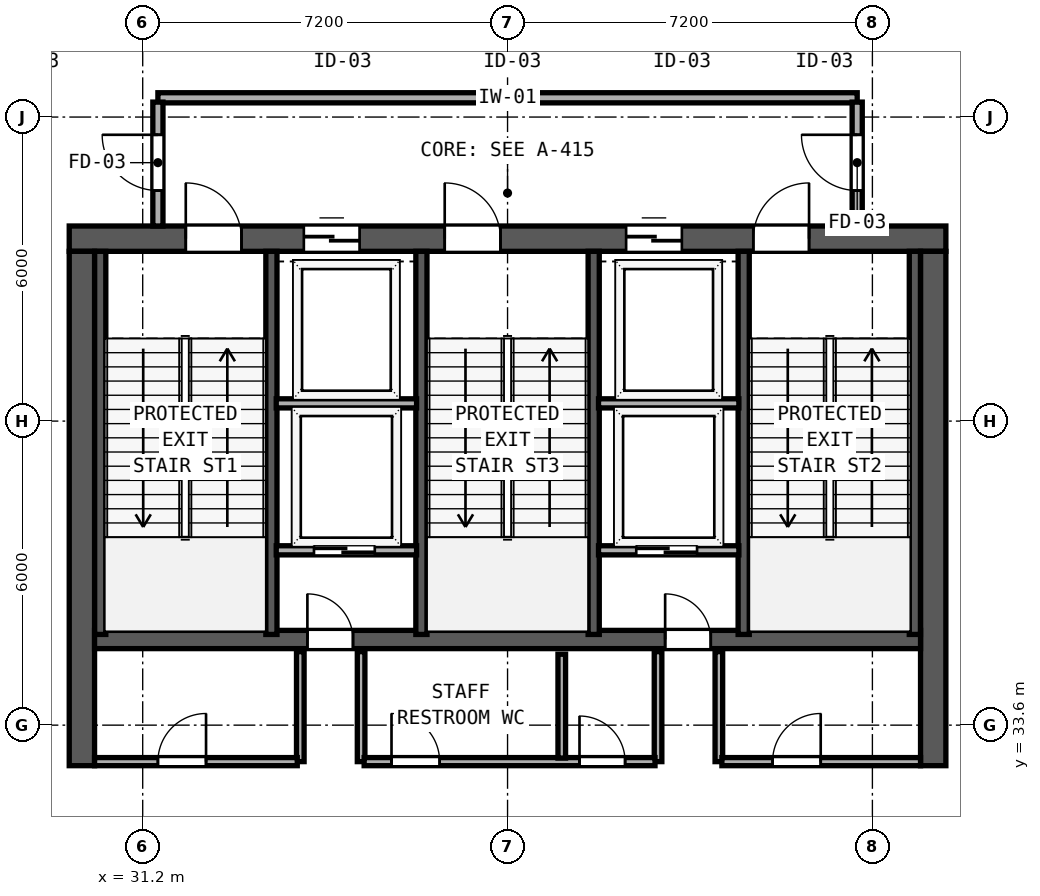
"""IFC4 building model, lengths in metres.
Left out: names, types, materials, properties, quantities, classifications, styles, units other than length and angle.
Written with IfcOpenShell. Run it as: python <this file> out.ifc"""

import sys

from ifc_helpers import new_model, si_unit, direction, frame, frame_2d, origin, place, context, subcontext, project, spatial, rectangle, extrude, element, fill, save


model = new_model("IFC4")
c1 = context("Model", 3, precision=1e-05, world=origin(), true_north=direction((0.0, 1.0)))
c2 = subcontext(c1, "Body", "Model", "MODEL_VIEW")
j1 = project(units=[si_unit("LENGTHUNIT", "METRE"), si_unit("PLANEANGLEUNIT", "RADIAN")], contexts=[c1])
p1 = place(None, origin())
s1 = spatial("IfcSite", under=j1, at=p1, CompositionType="ELEMENT")
p2 = place(p1, origin())
s2 = spatial("IfcBuilding", under=s1, at=p2, CompositionType="ELEMENT")
p3 = place(p2, frame((0.0, 0.0, 318.2)))
s3 = spatial("IfcBuildingStorey", under=s2, at=p3, CompositionType="ELEMENT", Elevation=318.2)
p4 = place(p3, frame((29.75, 43.2, 0.0), z_axis=(0.0, 0.0, 1.0), x_axis=(1.0, 0.0, 0.0)))
e1 = element("IfcWall", 1, at=p4, inside=s3, PredefinedType="SHEAR", context=c2, shape_type="SweptSolid", body=[
    extrude(rectangle(XDim=17.3, YDim=0.5, at=frame_2d((8.65, 0.0))), origin(), (0.0, 0.0, 1.0), 4.76),
])
p5 = place(p4, frame((2.3, 0.0, 0.0)))
e2 = element("IfcOpeningElement", 2, at=p5, cuts=e1, PredefinedType="OPENING", context=c2, shape_type="SweptSolid", body=[
    extrude(rectangle(XDim=1.1, YDim=2.15, at=frame_2d((0.55, 1.075))), frame((0.0, 0.26, 0.0), z_axis=(0.0, -1.0, 0.0), x_axis=(1.0, 0.0, 0.0)), (0.0, 0.0, 1.0), 0.52),
])
p6 = place(p4, frame((7.41, 0.0, 0.0)))
e3 = element("IfcOpeningElement", 3, at=p6, cuts=e1, PredefinedType="OPENING", context=c2, shape_type="SweptSolid", body=[
    extrude(rectangle(XDim=1.1, YDim=2.15, at=frame_2d((0.55, 1.075))), frame((0.0, 0.26, 0.0), z_axis=(0.0, -1.0, 0.0), x_axis=(1.0, 0.0, 0.0)), (0.0, 0.0, 1.0), 0.52),
])
p7 = place(p4, frame((13.5, 0.0, 0.0)))
e4 = element("IfcOpeningElement", 4, at=p7, cuts=e1, PredefinedType="OPENING", context=c2, shape_type="SweptSolid", body=[
    extrude(rectangle(XDim=1.1, YDim=2.15, at=frame_2d((0.55, 1.075))), frame((0.0, 0.26, 0.0), z_axis=(0.0, -1.0, 0.0), x_axis=(1.0, 0.0, 0.0)), (0.0, 0.0, 1.0), 0.52),
])
p8 = place(p4, frame((4.63, 0.0, 0.0)))
e5 = element("IfcOpeningElement", 5, at=p8, cuts=e1, PredefinedType="OPENING", context=c2, shape_type="SweptSolid", body=[
    extrude(rectangle(XDim=1.1, YDim=2.2, at=frame_2d((0.55, 1.1))), frame((0.0, 0.26, 0.0), z_axis=(0.0, -1.0, 0.0), x_axis=(1.0, 0.0, 0.0)), (0.0, 0.0, 1.0), 0.52),
])
p9 = place(p4, frame((10.99, 0.0, 0.0)))
e6 = element("IfcOpeningElement", 6, at=p9, cuts=e1, PredefinedType="OPENING", context=c2, shape_type="SweptSolid", body=[
    extrude(rectangle(XDim=1.1, YDim=2.2, at=frame_2d((0.55, 1.1))), frame((0.0, 0.26, 0.0), z_axis=(0.0, -1.0, 0.0), x_axis=(1.0, 0.0, 0.0)), (0.0, 0.0, 1.0), 0.52),
])
for number, where, z_axis, x_axis in (
    (7, (30.0, 32.8, 0.0), (0.0, 0.0, 1.0), (0.0, 1.0, 0.0)),
    (8, (46.8, 32.8, 0.0), (0.0, 0.0, 1.0), (0.0, 1.0, 0.0)),
):
    element("IfcWall", number, at=place(p3, frame(where, z_axis=z_axis, x_axis=x_axis)), inside=s3, PredefinedType="SHEAR", context=c2, shape_type="SweptSolid", body=[
        extrude(rectangle(XDim=10.15, YDim=0.5, at=frame_2d((5.075, 0.0))), origin(), (0.0, 0.0, 1.0), 4.76),
    ])
p10 = place(p3, frame((30.25, 35.29, 0.0), z_axis=(0.0, 0.0, 1.0), x_axis=(1.0, 0.0, 0.0)))
e9 = element("IfcWall", 9, at=p10, inside=s3, PredefinedType="SHEAR", context=c2, shape_type="SweptSolid", body=[
    extrude(rectangle(XDim=16.3, YDim=0.36, at=frame_2d((8.15, 0.0))), origin(), (0.0, 0.0, 1.0), 4.76),
])
p11 = place(p10, frame((5.1, 0.0, 0.0), z_axis=(0.0, 0.0, 1.0), x_axis=(-1.0, 0.0, 0.0)))
e10 = element("IfcOpeningElement", 10, at=p11, cuts=e9, PredefinedType="OPENING", context=c2, shape_type="SweptSolid", body=[
    extrude(rectangle(XDim=0.9, YDim=2.1, at=frame_2d((0.45, 1.05))), frame((0.0, 0.19, 0.0), z_axis=(0.0, -1.0, 0.0), x_axis=(1.0, 0.0, 0.0)), (0.0, 0.0, 1.0), 0.38),
])
p12 = place(p10, frame((12.16, 0.0, 0.0), z_axis=(0.0, 0.0, 1.0), x_axis=(-1.0, 0.0, 0.0)))
e11 = element("IfcOpeningElement", 11, at=p12, cuts=e9, PredefinedType="OPENING", context=c2, shape_type="SweptSolid", body=[
    extrude(rectangle(XDim=0.9, YDim=2.1, at=frame_2d((0.45, 1.05))), frame((0.0, 0.19, 0.0), z_axis=(0.0, -1.0, 0.0), x_axis=(1.0, 0.0, 0.0)), (0.0, 0.0, 1.0), 0.38),
])
for number, where, z_axis, x_axis in (
    (12, (30.362, 35.39, 0.0), (0.0, 0.0, 1.0), (0.0, 1.0, 0.0)),
    (13, (33.74, 35.39, 0.0), (0.0, 0.0, 1.0), (0.0, 1.0, 0.0)),
    (14, (36.7, 35.39, 0.0), (0.0, 0.0, 1.0), (0.0, 1.0, 0.0)),
    (15, (40.1, 35.39, 0.0), (0.0, 0.0, 1.0), (0.0, 1.0, 0.0)),
    (16, (43.06, 35.39, 0.0), (0.0, 0.0, 1.0), (0.0, 1.0, 0.0)),
    (17, (46.438, 35.39, 0.0), (0.0, 0.0, 1.0), (0.0, 1.0, 0.0)),
):
    element("IfcWall", number, at=place(p3, frame(where, z_axis=z_axis, x_axis=x_axis)), inside=s3, PredefinedType="SHEAR", context=c2, shape_type="SweptSolid", body=[
        extrude(rectangle(XDim=7.56, YDim=0.22, at=frame_2d((3.78, 0.0))), origin(), (0.0, 0.0, 1.0), 4.76),
    ])
p13 = place(p3, frame((31.5, 45.98, 0.0), z_axis=(0.0, 0.0, 1.0), x_axis=(1.0, 0.0, 0.0)))
e18 = element("IfcWall", 18, at=p13, inside=s3, PredefinedType="SOLIDWALL", context=c2, shape_type="SweptSolid", body=[
    extrude(rectangle(XDim=13.8, YDim=0.2, at=frame_2d((6.9, 0.0))), origin(), (0.0, 0.0, 1.0), 4.76),
])
p14 = place(p3, frame((31.5, 43.45, 0.0), z_axis=(0.0, 0.0, 1.0), x_axis=(0.0, 1.0, 0.0)))
e19 = element("IfcWall", 19, at=p14, inside=s3, PredefinedType="SOLIDWALL", context=c2, shape_type="SweptSolid", body=[
    extrude(rectangle(XDim=2.445, YDim=0.2, at=frame_2d((1.223, 0.0))), origin(), (0.0, 0.0, 1.0), 4.76),
])
p15 = place(p14, frame((1.8, 0.0, 0.0), z_axis=(0.0, 0.0, 1.0), x_axis=(-1.0, 0.0, 0.0)))
e20 = element("IfcOpeningElement", 20, at=p15, cuts=e19, PredefinedType="OPENING", context=c2, shape_type="SweptSolid", body=[
    extrude(rectangle(XDim=1.1, YDim=2.15, at=frame_2d((0.55, 1.075))), frame((0.0, 0.11, 0.0), z_axis=(0.0, -1.0, 0.0), x_axis=(1.0, 0.0, 0.0)), (0.0, 0.0, 1.0), 0.22),
])
p16 = place(p3, frame((45.3, 43.45, 0.0), z_axis=(0.0, 0.0, 1.0), x_axis=(0.0, 1.0, 0.0)))
e21 = element("IfcWall", 21, at=p16, inside=s3, PredefinedType="SOLIDWALL", context=c2, shape_type="SweptSolid", body=[
    extrude(rectangle(XDim=2.445, YDim=0.2, at=frame_2d((1.223, 0.0))), origin(), (0.0, 0.0, 1.0), 4.76),
])
p17 = place(p16, frame((0.7, 0.0, 0.0)))
e22 = element("IfcOpeningElement", 22, at=p17, cuts=e21, PredefinedType="OPENING", context=c2, shape_type="SweptSolid", body=[
    extrude(rectangle(XDim=1.1, YDim=2.15, at=frame_2d((0.55, 1.075))), frame((0.0, 0.11, 0.0), z_axis=(0.0, -1.0, 0.0), x_axis=(1.0, 0.0, 0.0)), (0.0, 0.0, 1.0), 0.22),
])
for number, where, z_axis, x_axis in (
    (23, (33.835, 39.95, 0.0), (0.0, 0.0, 1.0), (1.0, 0.0, 0.0)),
    (24, (40.195, 39.95, 0.0), (0.0, 0.0, 1.0), (1.0, 0.0, 0.0)),
):
    element("IfcWall", number, at=place(p3, frame(where, z_axis=z_axis, x_axis=x_axis)), inside=s3, PredefinedType="SOLIDWALL", context=c2, shape_type="SweptSolid", body=[
        extrude(rectangle(XDim=2.77, YDim=0.18, at=frame_2d((1.385, 0.0))), origin(), (0.0, 0.0, 1.0), 4.76),
    ])
p18 = place(p3, frame((33.835, 37.05, 0.0), z_axis=(0.0, 0.0, 1.0), x_axis=(1.0, 0.0, 0.0)))
e25 = element("IfcWall", 25, at=p18, inside=s3, PredefinedType="SOLIDWALL", context=c2, shape_type="SweptSolid", body=[
    extrude(rectangle(XDim=2.77, YDim=0.18, at=frame_2d((1.385, 0.0))), origin(), (0.0, 0.0, 1.0), 4.76),
])
p19 = place(p18, frame((1.945, 0.0, 0.0), z_axis=(0.0, 0.0, 1.0), x_axis=(-1.0, 0.0, 0.0)))
e26 = element("IfcOpeningElement", 26, at=p19, cuts=e25, PredefinedType="OPENING", context=c2, shape_type="SweptSolid", body=[
    extrude(rectangle(XDim=1.2, YDim=2.2, at=frame_2d((0.6, 1.1))), frame((0.0, 0.1, 0.0), z_axis=(0.0, -1.0, 0.0), x_axis=(1.0, 0.0, 0.0)), (0.0, 0.0, 1.0), 0.2),
])
for number, where, z_axis, x_axis in (
    (27, (34.31, 32.88, 0.0), (0.0, 0.0, 1.0), (0.0, 1.0, 0.0)),
    (28, (35.51, 32.88, 0.0), (0.0, 0.0, 1.0), (0.0, 1.0, 0.0)),
):
    element("IfcWall", number, at=place(p3, frame(where, z_axis=z_axis, x_axis=x_axis)), inside=s3, PredefinedType="SOLIDWALL", context=c2, shape_type="SweptSolid", body=[
        extrude(rectangle(XDim=2.17, YDim=0.15, at=frame_2d((1.085, 0.0))), origin(), (0.0, 0.0, 1.0), 4.76),
    ])
p20 = place(p3, frame((40.195, 37.05, 0.0), z_axis=(0.0, 0.0, 1.0), x_axis=(1.0, 0.0, 0.0)))
e29 = element("IfcWall", 29, at=p20, inside=s3, PredefinedType="SOLIDWALL", context=c2, shape_type="SweptSolid", body=[
    extrude(rectangle(XDim=2.77, YDim=0.18, at=frame_2d((1.385, 0.0))), origin(), (0.0, 0.0, 1.0), 4.76),
])
p21 = place(p20, frame((1.945, 0.0, 0.0), z_axis=(0.0, 0.0, 1.0), x_axis=(-1.0, 0.0, 0.0)))
e30 = element("IfcOpeningElement", 30, at=p21, cuts=e29, PredefinedType="OPENING", context=c2, shape_type="SweptSolid", body=[
    extrude(rectangle(XDim=1.2, YDim=2.2, at=frame_2d((0.6, 1.1))), frame((0.0, 0.1, 0.0), z_axis=(0.0, -1.0, 0.0), x_axis=(1.0, 0.0, 0.0)), (0.0, 0.0, 1.0), 0.2),
])
for number, where, z_axis, x_axis in (
    (31, (41.37, 32.88, 0.0), (0.0, 0.0, 1.0), (0.0, 1.0, 0.0)),
    (32, (42.57, 32.88, 0.0), (0.0, 0.0, 1.0), (0.0, 1.0, 0.0)),
):
    element("IfcWall", number, at=place(p3, frame(where, z_axis=z_axis, x_axis=x_axis)), inside=s3, PredefinedType="SOLIDWALL", context=c2, shape_type="SweptSolid", body=[
        extrude(rectangle(XDim=2.17, YDim=0.15, at=frame_2d((1.085, 0.0))), origin(), (0.0, 0.0, 1.0), 4.76),
    ])
p22 = place(p3, frame((30.25, 32.88, 0.0), z_axis=(0.0, 0.0, 1.0), x_axis=(1.0, 0.0, 0.0)))
e33 = element("IfcWall", 33, at=p22, inside=s3, PredefinedType="SOLIDWALL", context=c2, shape_type="SweptSolid", body=[
    extrude(rectangle(XDim=4.0, YDim=0.16, at=frame_2d((2.0, 0.0))), origin(), (0.0, 0.0, 1.0), 4.76),
])
p23 = place(p22, frame((2.2, 0.0, 0.0), z_axis=(0.0, 0.0, 1.0), x_axis=(-1.0, 0.0, 0.0)))
e34 = element("IfcOpeningElement", 34, at=p23, cuts=e33, PredefinedType="OPENING", context=c2, shape_type="SweptSolid", body=[
    extrude(rectangle(XDim=0.95, YDim=2.12, at=frame_2d((0.475, 1.06))), frame((0.0, 0.09, 0.0), z_axis=(0.0, -1.0, 0.0), x_axis=(1.0, 0.0, 0.0)), (0.0, 0.0, 1.0), 0.18),
])
p24 = place(p3, frame((35.57, 32.88, 0.0), z_axis=(0.0, 0.0, 1.0), x_axis=(1.0, 0.0, 0.0)))
e35 = element("IfcWall", 35, at=p24, inside=s3, PredefinedType="SOLIDWALL", context=c2, shape_type="SweptSolid", body=[
    extrude(rectangle(XDim=5.74, YDim=0.16, at=frame_2d((2.87, 0.0))), origin(), (0.0, 0.0, 1.0), 4.76),
])
p25 = place(p24, frame((1.49, 0.0, 0.0), z_axis=(0.0, 0.0, 1.0), x_axis=(-1.0, 0.0, 0.0)))
e36 = element("IfcOpeningElement", 36, at=p25, cuts=e35, PredefinedType="OPENING", context=c2, shape_type="SweptSolid", body=[
    extrude(rectangle(XDim=0.95, YDim=2.12, at=frame_2d((0.475, 1.06))), frame((0.0, 0.09, 0.0), z_axis=(0.0, -1.0, 0.0), x_axis=(1.0, 0.0, 0.0)), (0.0, 0.0, 1.0), 0.18),
])
p26 = place(p24, frame((5.15, 0.0, 0.0), z_axis=(0.0, 0.0, 1.0), x_axis=(-1.0, 0.0, 0.0)))
e37 = element("IfcOpeningElement", 37, at=p26, cuts=e35, PredefinedType="OPENING", context=c2, shape_type="SweptSolid", body=[
    extrude(rectangle(XDim=0.9, YDim=2.1, at=frame_2d((0.45, 1.05))), frame((0.0, 0.09, 0.0), z_axis=(0.0, -1.0, 0.0), x_axis=(1.0, 0.0, 0.0)), (0.0, 0.0, 1.0), 0.18),
])
p27 = place(p3, frame((42.63, 32.88, 0.0), z_axis=(0.0, 0.0, 1.0), x_axis=(1.0, 0.0, 0.0)))
e38 = element("IfcWall", 38, at=p27, inside=s3, PredefinedType="SOLIDWALL", context=c2, shape_type="SweptSolid", body=[
    extrude(rectangle(XDim=3.92, YDim=0.16, at=frame_2d((1.96, 0.0))), origin(), (0.0, 0.0, 1.0), 4.76),
])
p28 = place(p27, frame((1.95, 0.0, 0.0), z_axis=(0.0, 0.0, 1.0), x_axis=(-1.0, 0.0, 0.0)))
e39 = element("IfcOpeningElement", 39, at=p28, cuts=e38, PredefinedType="OPENING", context=c2, shape_type="SweptSolid", body=[
    extrude(rectangle(XDim=0.95, YDim=2.12, at=frame_2d((0.475, 1.06))), frame((0.0, 0.09, 0.0), z_axis=(0.0, -1.0, 0.0), x_axis=(1.0, 0.0, 0.0)), (0.0, 0.0, 1.0), 0.18),
])
p29 = place(p3, frame((39.47, 32.95, 0.0), z_axis=(0.0, 0.0, 1.0), x_axis=(0.0, 1.0, 0.0)))
e40 = element("IfcWall", 40, at=p29, inside=s3, PredefinedType="SOLIDWALL", context=c2, shape_type="SweptSolid", body=[
    extrude(rectangle(XDim=2.05, YDim=0.15, at=frame_2d((1.025, 0.0))), origin(), (0.0, 0.0, 1.0), 4.76),
])
p30 = place(p5, origin())
e41 = element("IfcDoor", 41, at=p30, inside=s3, OperationType="SINGLE_SWING_LEFT", PredefinedType="DOOR", context=c2, shape_type="SweptSolid", body=[
    extrude(rectangle(XDim=1.1, YDim=2.15, at=frame_2d((0.55, 1.075))), frame((0.0, 0.185, 0.0), z_axis=(0.0, -1.0, 0.0), x_axis=(1.0, 0.0, 0.0)), (0.0, 0.0, 1.0), 0.05),
])
fill(e2, e41)
p31 = place(p6, origin())
e42 = element("IfcDoor", 42, at=p31, inside=s3, OperationType="SINGLE_SWING_LEFT", PredefinedType="DOOR", context=c2, shape_type="SweptSolid", body=[
    extrude(rectangle(XDim=1.1, YDim=2.15, at=frame_2d((0.55, 1.075))), frame((0.0, 0.185, 0.0), z_axis=(0.0, -1.0, 0.0), x_axis=(1.0, 0.0, 0.0)), (0.0, 0.0, 1.0), 0.05),
])
fill(e3, e42)
p32 = place(p7, origin())
e43 = element("IfcDoor", 43, at=p32, inside=s3, OperationType="SINGLE_SWING_RIGHT", PredefinedType="DOOR", context=c2, shape_type="SweptSolid", body=[
    extrude(rectangle(XDim=1.1, YDim=2.15, at=frame_2d((0.55, 1.075))), frame((0.0, 0.185, 0.0), z_axis=(0.0, -1.0, 0.0), x_axis=(1.0, 0.0, 0.0)), (0.0, 0.0, 1.0), 0.05),
])
fill(e4, e43)
p33 = place(p15, origin())
e44 = element("IfcDoor", 44, at=p33, inside=s3, OperationType="SINGLE_SWING_LEFT", PredefinedType="DOOR", context=c2, shape_type="SweptSolid", body=[
    extrude(rectangle(XDim=1.1, YDim=2.15, at=frame_2d((0.55, 1.075))), frame((0.0, 0.025, 0.0), z_axis=(0.0, -1.0, 0.0), x_axis=(1.0, 0.0, 0.0)), (0.0, 0.0, 1.0), 0.05),
])
fill(e20, e44)
p34 = place(p17, origin())
e45 = element("IfcDoor", 45, at=p34, inside=s3, OperationType="SINGLE_SWING_RIGHT", PredefinedType="DOOR", context=c2, shape_type="SweptSolid", body=[
    extrude(rectangle(XDim=1.1, YDim=2.15, at=frame_2d((0.55, 1.075))), frame((0.0, 0.025, 0.0), z_axis=(0.0, -1.0, 0.0), x_axis=(1.0, 0.0, 0.0)), (0.0, 0.0, 1.0), 0.05),
])
fill(e22, e45)
p35 = place(p8, origin())
e46 = element("IfcDoor", 46, at=p35, inside=s3, OperationType="SLIDING_TO_LEFT", PredefinedType="DOOR", context=c2, shape_type="SweptSolid", body=[
    extrude(rectangle(XDim=1.1, YDim=2.2, at=frame_2d((0.55, 1.1))), frame((0.0, 0.185, 0.0), z_axis=(0.0, -1.0, 0.0), x_axis=(1.0, 0.0, 0.0)), (0.0, 0.0, 1.0), 0.05),
])
fill(e5, e46)
p36 = place(p9, origin())
e47 = element("IfcDoor", 47, at=p36, inside=s3, OperationType="SLIDING_TO_LEFT", PredefinedType="DOOR", context=c2, shape_type="SweptSolid", body=[
    extrude(rectangle(XDim=1.1, YDim=2.2, at=frame_2d((0.55, 1.1))), frame((0.0, 0.185, 0.0), z_axis=(0.0, -1.0, 0.0), x_axis=(1.0, 0.0, 0.0)), (0.0, 0.0, 1.0), 0.05),
])
fill(e6, e47)
p37 = place(p19, origin())
e48 = element("IfcDoor", 48, at=p37, inside=s3, OperationType="SLIDING_TO_RIGHT", PredefinedType="DOOR", context=c2, shape_type="SweptSolid", body=[
    extrude(rectangle(XDim=1.2, YDim=2.2, at=frame_2d((0.6, 1.1))), frame((0.0, 0.025, 0.0), z_axis=(0.0, -1.0, 0.0), x_axis=(1.0, 0.0, 0.0)), (0.0, 0.0, 1.0), 0.05),
])
fill(e26, e48)
p38 = place(p11, origin())
e49 = element("IfcDoor", 49, at=p38, inside=s3, OperationType="SINGLE_SWING_RIGHT", PredefinedType="DOOR", context=c2, shape_type="SweptSolid", body=[
    extrude(rectangle(XDim=0.9, YDim=2.1, at=frame_2d((0.45, 1.05))), frame((0.0, 0.025, 0.0), z_axis=(0.0, -1.0, 0.0), x_axis=(1.0, 0.0, 0.0)), (0.0, 0.0, 1.0), 0.05),
])
fill(e10, e49)
p39 = place(p21, origin())
e50 = element("IfcDoor", 50, at=p39, inside=s3, OperationType="SLIDING_TO_RIGHT", PredefinedType="DOOR", context=c2, shape_type="SweptSolid", body=[
    extrude(rectangle(XDim=1.2, YDim=2.2, at=frame_2d((0.6, 1.1))), frame((0.0, 0.025, 0.0), z_axis=(0.0, -1.0, 0.0), x_axis=(1.0, 0.0, 0.0)), (0.0, 0.0, 1.0), 0.05),
])
fill(e30, e50)
p40 = place(p12, origin())
e51 = element("IfcDoor", 51, at=p40, inside=s3, OperationType="SINGLE_SWING_RIGHT", PredefinedType="DOOR", context=c2, shape_type="SweptSolid", body=[
    extrude(rectangle(XDim=0.9, YDim=2.1, at=frame_2d((0.45, 1.05))), frame((0.0, 0.025, 0.0), z_axis=(0.0, -1.0, 0.0), x_axis=(1.0, 0.0, 0.0)), (0.0, 0.0, 1.0), 0.05),
])
fill(e11, e51)
p41 = place(p23, origin())
e52 = element("IfcDoor", 52, at=p41, inside=s3, OperationType="SINGLE_SWING_LEFT", PredefinedType="DOOR", context=c2, shape_type="SweptSolid", body=[
    extrude(rectangle(XDim=0.95, YDim=2.12, at=frame_2d((0.475, 1.06))), frame((0.0, 0.025, 0.0), z_axis=(0.0, -1.0, 0.0), x_axis=(1.0, 0.0, 0.0)), (0.0, 0.0, 1.0), 0.05),
])
fill(e34, e52)
p42 = place(p25, origin())
e53 = element("IfcDoor", 53, at=p42, inside=s3, OperationType="SINGLE_SWING_RIGHT", PredefinedType="DOOR", context=c2, shape_type="SweptSolid", body=[
    extrude(rectangle(XDim=0.95, YDim=2.12, at=frame_2d((0.475, 1.06))), frame((0.0, 0.025, 0.0), z_axis=(0.0, -1.0, 0.0), x_axis=(1.0, 0.0, 0.0)), (0.0, 0.0, 1.0), 0.05),
])
fill(e36, e53)
p43 = place(p26, origin())
e54 = element("IfcDoor", 54, at=p43, inside=s3, OperationType="SINGLE_SWING_RIGHT", PredefinedType="DOOR", context=c2, shape_type="SweptSolid", body=[
    extrude(rectangle(XDim=0.9, YDim=2.1, at=frame_2d((0.45, 1.05))), frame((0.0, 0.025, 0.0), z_axis=(0.0, -1.0, 0.0), x_axis=(1.0, 0.0, 0.0)), (0.0, 0.0, 1.0), 0.05),
])
fill(e37, e54)
p44 = place(p28, origin())
e55 = element("IfcDoor", 55, at=p44, inside=s3, OperationType="SINGLE_SWING_LEFT", PredefinedType="DOOR", context=c2, shape_type="SweptSolid", body=[
    extrude(rectangle(XDim=0.95, YDim=2.12, at=frame_2d((0.475, 1.06))), frame((0.0, 0.025, 0.0), z_axis=(0.0, -1.0, 0.0), x_axis=(1.0, 0.0, 0.0)), (0.0, 0.0, 1.0), 0.05),
])
fill(e39, e55)
save(model, sys.argv[1])
